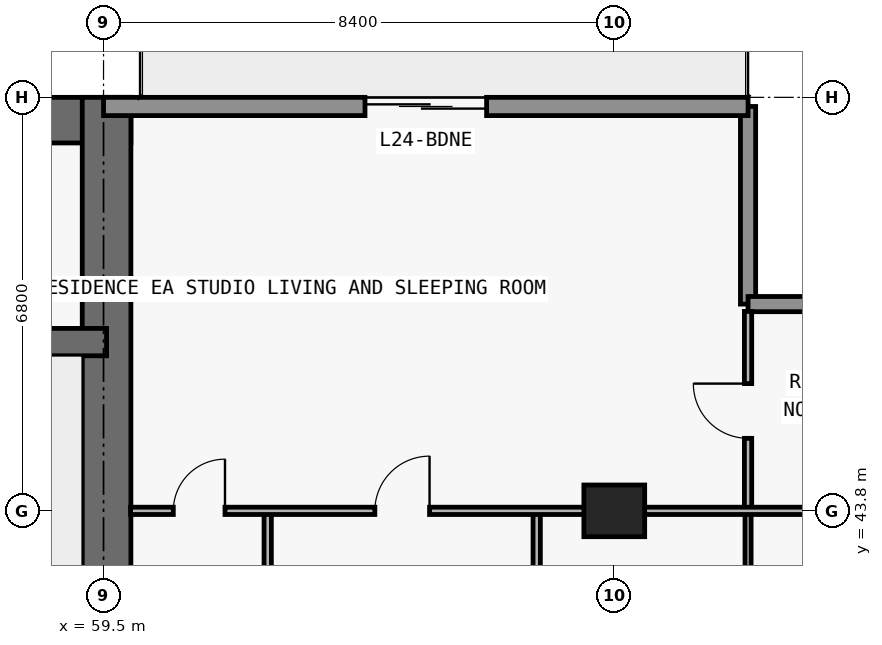
"""IFC4 building model, lengths in metres.
Left out: names, types, materials, properties, quantities, classifications, styles, units other than length and angle.
Written with IfcOpenShell. Run it as: python <this file> out.ifc"""

import sys

from ifc_helpers import new_model, si_unit, direction, frame, frame_2d, origin, origin_2d, place, context, subcontext, project, spatial, rectangle, extrude, element, fill, save


model = new_model("IFC4")
c1 = context("Model", 3, precision=1e-05, world=origin(), true_north=direction((0.0, 1.0)))
c2 = subcontext(c1, "Body", "Model", "MODEL_VIEW")
j1 = project(units=[si_unit("LENGTHUNIT", "METRE"), si_unit("PLANEANGLEUNIT", "RADIAN")], contexts=[c1])
p1 = place(None, origin())
s1 = spatial("IfcSite", under=j1, at=p1, CompositionType="ELEMENT")
p2 = place(p1, origin())
s2 = spatial("IfcBuilding", under=s1, at=p2, CompositionType="ELEMENT")
p3 = place(p2, frame((0.0, 0.0, 91.2)))
s3 = spatial("IfcBuildingStorey", under=s2, at=p3, CompositionType="ELEMENT", Elevation=91.2)
p4 = place(p3, frame((67.9, 43.8, 0.0), z_axis=(0.0, 0.0, 1.0), x_axis=(1.0, 0.0, 0.0)))
e1 = element("IfcColumn", 1, at=p4, inside=s3, PredefinedType="COLUMN", context=c2, shape_type="SweptSolid", body=[
    extrude(rectangle(XDim=1.0, YDim=0.85, at=origin_2d()), origin(), (0.0, 0.0, 1.0), 3.05),
])
p5 = place(p3, frame((17.85, 50.225, 0.0), z_axis=(0.0, 0.0, 1.0), x_axis=(1.0, 0.0, 0.0)))
e2 = element("IfcWall", 2, at=p5, inside=s3, PredefinedType="SHEAR", context=c2, shape_type="SweptSolid", body=[
    extrude(rectangle(XDim=42.1, YDim=0.75, at=frame_2d((21.05, 0.0))), origin(), (0.0, 0.0, 1.0), 3.05),
])
p6 = place(p3, frame((59.55, 36.55, 0.0), z_axis=(0.0, 0.0, 1.0), x_axis=(0.0, 1.0, 0.0)))
e3 = element("IfcWall", 3, at=p6, inside=s3, PredefinedType="SHEAR", context=c2, shape_type="SweptSolid", body=[
    extrude(rectangle(XDim=14.05, YDim=0.8, at=frame_2d((7.025, 0.0))), origin(), (0.0, 0.0, 1.0), 3.05),
])
p7 = place(p3, frame((18.25, 46.575, 0.0), z_axis=(0.0, 0.0, 1.0), x_axis=(1.0, 0.0, 0.0)))
e4 = element("IfcWall", 4, at=p7, inside=s3, PredefinedType="SHEAR", context=c2, shape_type="SweptSolid", body=[
    extrude(rectangle(XDim=41.3, YDim=0.45, at=frame_2d((20.65, 0.0))), origin(), (0.0, 0.0, 1.0), 3.05),
])
p8 = place(p7, frame((7.625, 0.0, 0.0)))
e5 = element("IfcOpeningElement", 5, at=p8, cuts=e4, PredefinedType="OPENING", context=c2, shape_type="SweptSolid", body=[
    extrude(rectangle(XDim=1.05, YDim=2.15, at=frame_2d((0.525, 1.075))), frame((0.0, 0.235, 0.0), z_axis=(0.0, -1.0, 0.0), x_axis=(1.0, 0.0, 0.0)), (0.0, 0.0, 1.0), 0.47),
])
p9 = place(p7, frame((32.675, 0.0, 0.0)))
e6 = element("IfcOpeningElement", 6, at=p9, cuts=e4, PredefinedType="OPENING", context=c2, shape_type="SweptSolid", body=[
    extrude(rectangle(XDim=1.05, YDim=2.15, at=frame_2d((0.525, 1.075))), frame((0.0, 0.235, 0.0), z_axis=(0.0, -1.0, 0.0), x_axis=(1.0, 0.0, 0.0)), (0.0, 0.0, 1.0), 0.47),
])
p10 = place(p3, frame((70.1, 50.45, 0.0), z_axis=(0.0, 0.0, 1.0), x_axis=(0.0, -1.0, 0.0)))
e7 = element("IfcWall", 7, at=p10, inside=s3, PredefinedType="ELEMENTEDWALL", context=c2, shape_type="SweptSolid", body=[
    extrude(rectangle(XDim=3.25, YDim=0.25, at=frame_2d((1.625, 0.0))), origin(), (0.0, 0.0, 1.0), 3.05),
])
p11 = place(p3, frame((70.1, 47.2, 0.0), z_axis=(0.0, 0.0, 1.0), x_axis=(1.0, 0.0, 0.0)))
e8 = element("IfcWall", 8, at=p11, inside=s3, PredefinedType="ELEMENTEDWALL", context=c2, shape_type="SweptSolid", body=[
    extrude(rectangle(XDim=3.65, YDim=0.25, at=frame_2d((1.825, 0.0))), origin(), (0.0, 0.0, 1.0), 3.05),
])
p12 = place(p3, frame((59.5, 50.45, 0.0), z_axis=(0.0, 0.0, 1.0), x_axis=(1.0, 0.0, 0.0)))
e9 = element("IfcWall", 9, at=p12, inside=s3, PredefinedType="STANDARD", context=c2, shape_type="SweptSolid", body=[
    extrude(rectangle(XDim=10.6, YDim=0.3, at=frame_2d((5.3, 0.0))), origin(), (0.0, 0.0, 1.0), 3.05),
])
p13 = place(p12, frame((4.3, 0.0, 0.0)))
e10 = element("IfcOpeningElement", 10, at=p13, cuts=e9, PredefinedType="OPENING", context=c2, shape_type="SweptSolid", body=[
    extrude(rectangle(XDim=2.0, YDim=2.3, at=frame_2d((1.0, 1.15))), frame((0.0, 0.16, 0.0), z_axis=(0.0, -1.0, 0.0), x_axis=(1.0, 0.0, 0.0)), (0.0, 0.0, 1.0), 0.32),
])
p14 = place(p3, frame((62.2, 36.95, 0.0), z_axis=(0.0, 0.0, 1.0), x_axis=(0.0, 1.0, 0.0)))
e11 = element("IfcWall", 11, at=p14, inside=s3, PredefinedType="PARTITIONING", context=c2, shape_type="SweptSolid", body=[
    extrude(rectangle(XDim=6.85, YDim=0.12, at=frame_2d((3.425, 0.0))), origin(), (0.0, 0.0, 1.0), 2.499),
])
p15 = place(p14, frame((1.219, 0.0, 0.0)))
e12 = element("IfcOpeningElement", 12, at=p15, cuts=e11, PredefinedType="OPENING", context=c2, shape_type="SweptSolid", body=[
    extrude(rectangle(XDim=0.85, YDim=2.1, at=frame_2d((0.425, 1.05))), frame((0.0, 0.07, 0.0), z_axis=(0.0, -1.0, 0.0), x_axis=(1.0, 0.0, 0.0)), (0.0, 0.0, 1.0), 0.14),
])
p16 = place(p3, frame((66.624, 36.95, 0.0), z_axis=(0.0, 0.0, 1.0), x_axis=(0.0, 1.0, 0.0)))
e13 = element("IfcWall", 13, at=p16, inside=s3, PredefinedType="PARTITIONING", context=c2, shape_type="SweptSolid", body=[
    extrude(rectangle(XDim=6.85, YDim=0.12, at=frame_2d((3.425, 0.0))), origin(), (0.0, 0.0, 1.0), 3.05),
])
p17 = place(p16, frame((2.975, 0.0, 0.0)))
e14 = element("IfcOpeningElement", 14, at=p17, cuts=e13, PredefinedType="OPENING", context=c2, shape_type="SweptSolid", body=[
    extrude(rectangle(XDim=0.9, YDim=2.15, at=frame_2d((0.45, 1.075))), frame((0.0, 0.07, 0.0), z_axis=(0.0, -1.0, 0.0), x_axis=(1.0, 0.0, 0.0)), (0.0, 0.0, 1.0), 0.14),
])
p18 = place(p3, frame((70.1, 36.955, 0.0), z_axis=(0.0, 0.0, 1.0), x_axis=(0.0, 1.0, 0.0)))
e15 = element("IfcWall", 15, at=p18, inside=s3, PredefinedType="MOVABLE", context=c2, shape_type="SweptSolid", body=[
    extrude(rectangle(XDim=6.845, YDim=0.1, at=frame_2d((3.422, 0.0))), origin(), (0.0, 0.0, 1.0), 3.05),
])
p19 = place(p18, frame((2.972, 0.0, 0.0)))
e16 = element("IfcOpeningElement", 16, at=p19, cuts=e15, PredefinedType="OPENING", context=c2, shape_type="SweptSolid", body=[
    extrude(rectangle(XDim=0.9, YDim=2.15, at=frame_2d((0.45, 1.075))), frame((0.0, 0.06, 0.0), z_axis=(0.0, -1.0, 0.0), x_axis=(1.0, 0.0, 0.0)), (0.0, 0.0, 1.0), 0.12),
])
p20 = place(p3, frame((70.1, 43.805, 0.0), z_axis=(0.0, 0.0, 1.0), x_axis=(0.0, 1.0, 0.0)))
e17 = element("IfcWall", 17, at=p20, inside=s3, PredefinedType="PARTITIONING", context=c2, shape_type="SweptSolid", body=[
    extrude(rectangle(XDim=3.275, YDim=0.12, at=frame_2d((1.638, 0.0))), origin(), (0.0, 0.0, 1.0), 3.05),
])
p21 = place(p20, frame((1.188, 0.0, 0.0)))
e18 = element("IfcOpeningElement", 18, at=p21, cuts=e17, PredefinedType="OPENING", context=c2, shape_type="SweptSolid", body=[
    extrude(rectangle(XDim=0.9, YDim=2.15, at=frame_2d((0.45, 1.075))), frame((0.0, 0.07, 0.0), z_axis=(0.0, -1.0, 0.0), x_axis=(1.0, 0.0, 0.0)), (0.0, 0.0, 1.0), 0.14),
])
p22 = place(p3, frame((59.945, 43.8, 0.0), z_axis=(0.0, 0.0, 1.0), x_axis=(1.0, 0.0, 0.0)))
e19 = element("IfcWall", 19, at=p22, inside=s3, PredefinedType="PARTITIONING", context=c2, shape_type="SweptSolid", body=[
    extrude(rectangle(XDim=13.66, YDim=0.12, at=frame_2d((6.83, 0.0))), origin(), (0.0, 0.0, 1.0), 2.339),
])
p23 = place(p22, frame((4.017, 0.0, 0.0)))
e20 = element("IfcOpeningElement", 20, at=p23, cuts=e19, PredefinedType="OPENING", context=c2, shape_type="SweptSolid", body=[
    extrude(rectangle(XDim=0.9, YDim=2.15, at=frame_2d((0.45, 1.075))), frame((0.0, 0.07, 0.0), z_axis=(0.0, -1.0, 0.0), x_axis=(1.0, 0.0, 0.0)), (0.0, 0.0, 1.0), 0.14),
])
p24 = place(p22, frame((0.702, 0.0, 0.0)))
e21 = element("IfcOpeningElement", 21, at=p24, cuts=e19, PredefinedType="OPENING", context=c2, shape_type="SweptSolid", body=[
    extrude(rectangle(XDim=0.85, YDim=2.1, at=frame_2d((0.425, 1.05))), frame((0.0, 0.07, 0.0), z_axis=(0.0, -1.0, 0.0), x_axis=(1.0, 0.0, 0.0)), (0.0, 0.0, 1.0), 0.14),
])
p25 = place(p13, origin())
e22 = element("IfcDoor", 22, at=p25, inside=s3, OperationType="DOUBLE_DOOR_SLIDING", PredefinedType="DOOR", context=c2, shape_type="SweptSolid", body=[
    extrude(rectangle(XDim=2.0, YDim=2.3, at=frame_2d((1.0, 1.15))), frame((0.0, 0.025, 0.0), z_axis=(0.0, -1.0, 0.0), x_axis=(1.0, 0.0, 0.0)), (0.0, 0.0, 1.0), 0.05),
])
fill(e10, e22)
p26 = place(p23, origin())
e23 = element("IfcDoor", 23, at=p26, inside=s3, OperationType="SINGLE_SWING_RIGHT", PredefinedType="DOOR", context=c2, shape_type="SweptSolid", body=[
    extrude(rectangle(XDim=0.9, YDim=2.15, at=frame_2d((0.45, 1.075))), frame((0.0, 0.025, 0.0), z_axis=(0.0, -1.0, 0.0), x_axis=(1.0, 0.0, 0.0)), (0.0, 0.0, 1.0), 0.05),
])
fill(e20, e23)
p27 = place(p24, origin())
e24 = element("IfcDoor", 24, at=p27, inside=s3, OperationType="SINGLE_SWING_RIGHT", PredefinedType="DOOR", context=c2, shape_type="SweptSolid", body=[
    extrude(rectangle(XDim=0.85, YDim=2.1, at=frame_2d((0.425, 1.05))), frame((0.0, 0.025, 0.0), z_axis=(0.0, -1.0, 0.0), x_axis=(1.0, 0.0, 0.0)), (0.0, 0.0, 1.0), 0.05),
])
fill(e21, e24)
p28 = place(p21, origin())
e25 = element("IfcDoor", 25, at=p28, inside=s3, OperationType="SINGLE_SWING_RIGHT", PredefinedType="DOOR", context=c2, shape_type="SweptSolid", body=[
    extrude(rectangle(XDim=0.9, YDim=2.15, at=frame_2d((0.45, 1.075))), frame((0.0, 0.025, 0.0), z_axis=(0.0, -1.0, 0.0), x_axis=(1.0, 0.0, 0.0)), (0.0, 0.0, 1.0), 0.05),
])
fill(e18, e25)
save(model, sys.argv[1])
